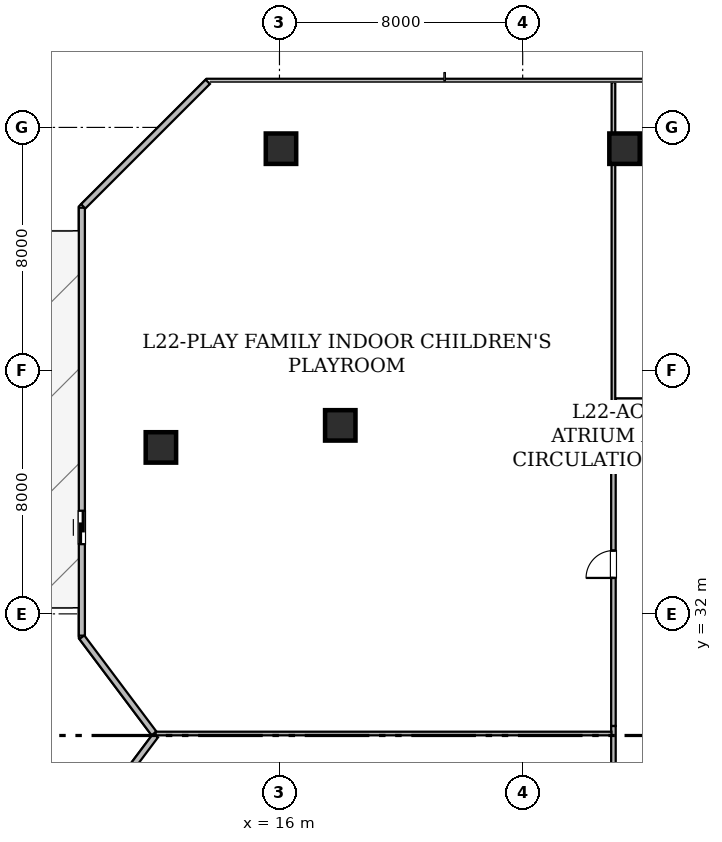
"""IFC4 building model, lengths in metres.
Left out: names, types, materials, properties, quantities, classifications, styles, units other than length and angle.
Written with IfcOpenShell. Run it as: python <this file> out.ifc"""

import sys

from ifc_helpers import new_model, si_unit, direction, frame, frame_2d, origin, origin_2d, place, context, subcontext, project, spatial, rectangle, hollow_rectangle, extrude, element, fill, save


model = new_model("IFC4")
c1 = context("Model", 3, precision=1e-05, world=origin(), true_north=direction((0.0, 1.0)))
c2 = subcontext(c1, "Body", "Model", "MODEL_VIEW")
j1 = project(units=[si_unit("LENGTHUNIT", "METRE"), si_unit("PLANEANGLEUNIT", "RADIAN")], contexts=[c1])
p1 = place(None, origin())
s1 = spatial("IfcSite", under=j1, at=p1, CompositionType="ELEMENT")
p2 = place(p1, origin())
s2 = spatial("IfcBuilding", under=s1, at=p2, CompositionType="ELEMENT")
p3 = place(p2, frame((0.0, 0.0, 89.8)))
s3 = spatial("IfcBuildingStorey", under=s2, at=p3, CompositionType="ELEMENT", Elevation=89.8)
for number, where, z_axis, x_axis in (
    (1, (16.05, 47.3, 0.025), (0.0, 0.0, 1.0), (1.0, 0.0, 0.0)),
    (2, (27.35, 47.3, 0.025), (0.0, 0.0, 1.0), (1.0, 0.0, 0.0)),
    (3, (12.1, 37.475, 0.025), (0.0, 0.0, 1.0), (1.0, 0.0, 0.0)),
):
    element("IfcColumn", number, at=place(p3, frame(where, z_axis=z_axis, x_axis=x_axis)), inside=s3, PredefinedType="COLUMN", context=c2, shape_type="SweptSolid", body=[
        extrude(hollow_rectangle(XDim=1.0, YDim=1.0, WallThickness=0.05, at=origin_2d()), origin(), (0.0, 0.0, 1.0), 4.775),
    ])
p4 = place(p3, frame((18.0, 38.2, 0.0), z_axis=(0.0, 0.0, 1.0), x_axis=(1.0, 0.0, 0.0)))
e4 = element("IfcColumn", 4, at=p4, inside=s3, PredefinedType="COLUMN", context=c2, shape_type="SweptSolid", body=[
    extrude(hollow_rectangle(XDim=1.0, YDim=1.0, WallThickness=0.05, at=origin_2d()), origin(), (0.0, 0.0, 1.0), 4.8),
])
p5 = place(p3, frame((9.53, 24.807, 0.0), z_axis=(0.0, 0.0, 1.0), x_axis=(0.600029358831, 0.799977980035, 0.0)))
e5 = element("IfcWall", 5, at=p5, inside=s3, PredefinedType="STANDARD", context=c2, shape_type="SweptSolid", body=[
    extrude(rectangle(XDim=3.991, YDim=0.2, at=frame_2d((1.996, 0.0))), origin(), (0.0, 0.0, 1.0), 4.58),
])
p6 = place(p3, frame((11.873, 28.069, 0.0), z_axis=(0.0, 0.0, 1.0), x_axis=(-0.600029630681, 0.799977776132, 0.0)))
e6 = element("IfcWall", 6, at=p6, inside=s3, PredefinedType="STANDARD", context=c2, shape_type="SweptSolid", body=[
    extrude(rectangle(XDim=3.955, YDim=0.2, at=frame_2d((1.978, 0.0))), origin(), (0.0, 0.0, 1.0), 4.58),
])
p7 = place(p3, frame((9.5, 31.284, 0.0), z_axis=(0.0, 0.0, 1.0), x_axis=(0.0, 1.0, 0.0)))
e7 = element("IfcWall", 7, at=p7, inside=s3, PredefinedType="STANDARD", context=c2, shape_type="SweptSolid", body=[
    extrude(rectangle(XDim=14.075, YDim=0.2, at=frame_2d((7.038, 0.0))), origin(), (0.0, 0.0, 1.0), 4.58),
])
p8 = place(p7, frame((3.009, 0.0, 0.0)))
e8 = element("IfcOpeningElement", 8, at=p8, cuts=e7, PredefinedType="OPENING", context=c2, shape_type="SweptSolid", body=[
    extrude(rectangle(XDim=1.1, YDim=2.2, at=frame_2d((0.55, 1.1))), frame((0.0, 0.11, 0.0), z_axis=(0.0, -1.0, 0.0), x_axis=(1.0, 0.0, 0.0)), (0.0, 0.0, 1.0), 0.22),
])
p9 = place(p3, frame((9.544, 45.403, 0.0), z_axis=(0.0, 0.0, 1.0), x_axis=(0.707127848917, 0.707085712828, 0.0)))
e9 = element("IfcWall", 9, at=p9, inside=s3, PredefinedType="STANDARD", context=c2, shape_type="SweptSolid", body=[
    extrude(rectangle(XDim=5.794, YDim=0.2, at=frame_2d((2.897, 0.0))), origin(), (0.0, 0.0, 1.0), 4.58),
])
p10 = place(p3, frame((26.985, 17.05, 0.0), z_axis=(0.0, 0.0, 1.0), x_axis=(0.0, 1.0, 0.0)))
e10 = element("IfcWall", 10, at=p10, inside=s3, PredefinedType="STANDARD", context=c2, shape_type="SweptSolid", body=[
    extrude(rectangle(XDim=11.264, YDim=0.15, at=frame_2d((5.632, 0.0))), origin(), (0.0, 0.0, 1.0), 3.797),
])
p11 = place(p10, frame((5.036, 0.0, 0.0)))
e11 = element("IfcOpeningElement", 11, at=p11, cuts=e10, PredefinedType="OPENING", context=c2, shape_type="SweptSolid", body=[
    extrude(rectangle(XDim=1.15, YDim=2.2, at=frame_2d((0.575, 1.1))), frame((0.0, 0.085, 0.0), z_axis=(0.0, -1.0, 0.0), x_axis=(1.0, 0.0, 0.0)), (0.0, 0.0, 1.0), 0.17),
])
p12 = place(p3, frame((26.985, 28.314, 0.0), z_axis=(0.0, 0.0, 1.0), x_axis=(0.0, 1.0, 0.0)))
e12 = element("IfcWall", 12, at=p12, inside=s3, PredefinedType="STANDARD", context=c2, shape_type="SweptSolid", body=[
    extrude(rectangle(XDim=10.636, YDim=0.15, at=frame_2d((5.318, 0.0))), origin(), (0.0, 0.0, 1.0), 3.797),
])
p13 = place(p12, frame((4.868, 0.0, 0.0)))
e13 = element("IfcOpeningElement", 13, at=p13, cuts=e12, PredefinedType="OPENING", context=c2, shape_type="SweptSolid", body=[
    extrude(rectangle(XDim=0.9, YDim=2.1, at=frame_2d((0.45, 1.05))), frame((0.0, 0.085, 0.0), z_axis=(0.0, -1.0, 0.0), x_axis=(1.0, 0.0, 0.0)), (0.0, 0.0, 1.0), 0.17),
])
p14 = place(p3, frame((27.05, 39.015, 0.0), z_axis=(0.0, 0.0, 1.0), x_axis=(1.0, 0.0, 0.0)))
e14 = element("IfcWall", 14, at=p14, inside=s3, PredefinedType="STANDARD", context=c2, shape_type="SweptSolid", body=[
    extrude(rectangle(XDim=14.2, YDim=0.15, at=frame_2d((7.1, 0.0))), origin(), (0.0, 0.0, 1.0), 3.797),
])
p15 = place(p14, frame((6.65, 0.0, 0.0)))
e15 = element("IfcOpeningElement", 15, at=p15, cuts=e14, PredefinedType="OPENING", context=c2, shape_type="SweptSolid", body=[
    extrude(rectangle(XDim=0.9, YDim=2.1, at=frame_2d((0.45, 1.05))), frame((0.0, 0.085, 0.0), z_axis=(0.0, -1.0, 0.0), x_axis=(1.0, 0.0, 0.0)), (0.0, 0.0, 1.0), 0.17),
])
p16 = place(p3, frame((11.928, 28.065, 0.0), z_axis=(0.0, 0.0, 1.0), x_axis=(1.0, 0.0, 0.0)))
e16 = element("IfcWall", 16, at=p16, inside=s3, PredefinedType="PARTITIONING", context=c2, shape_type="SweptSolid", body=[
    extrude(rectangle(XDim=14.99, YDim=0.12, at=frame_2d((7.495, 0.0))), origin(), (0.0, 0.0, 1.0), 3.797),
])
p17 = place(p3, frame((26.985, 49.49, 0.0), z_axis=(0.0, 0.0, 1.0), x_axis=(0.0, -1.0, 0.0)))
e17 = element("IfcWall", 17, at=p17, inside=s3, PredefinedType="PARTITIONING", context=c2, shape_type="SweptSolid", body=[
    extrude(rectangle(XDim=10.54, YDim=0.12, at=frame_2d((5.27, 0.0))), origin(), (0.0, 0.0, 1.0), 3.797),
])
p18 = place(p8, origin())
e18 = element("IfcDoor", 18, at=p18, inside=s3, OperationType="SLIDING_TO_LEFT", PredefinedType="DOOR", context=c2, shape_type="SweptSolid", body=[
    extrude(rectangle(XDim=1.1, YDim=2.2, at=frame_2d((0.55, 1.1))), frame((0.0, 0.025, 0.0), z_axis=(0.0, -1.0, 0.0), x_axis=(1.0, 0.0, 0.0)), (0.0, 0.0, 1.0), 0.05),
])
fill(e8, e18)
p19 = place(p13, origin())
e19 = element("IfcDoor", 19, at=p19, inside=s3, OperationType="SINGLE_SWING_LEFT", PredefinedType="DOOR", context=c2, shape_type="SweptSolid", body=[
    extrude(rectangle(XDim=0.9, YDim=2.1, at=frame_2d((0.45, 1.05))), frame((0.0, 0.025, 0.0), z_axis=(0.0, -1.0, 0.0), x_axis=(1.0, 0.0, 0.0)), (0.0, 0.0, 1.0), 0.05),
])
fill(e13, e19)
save(model, sys.argv[1])
